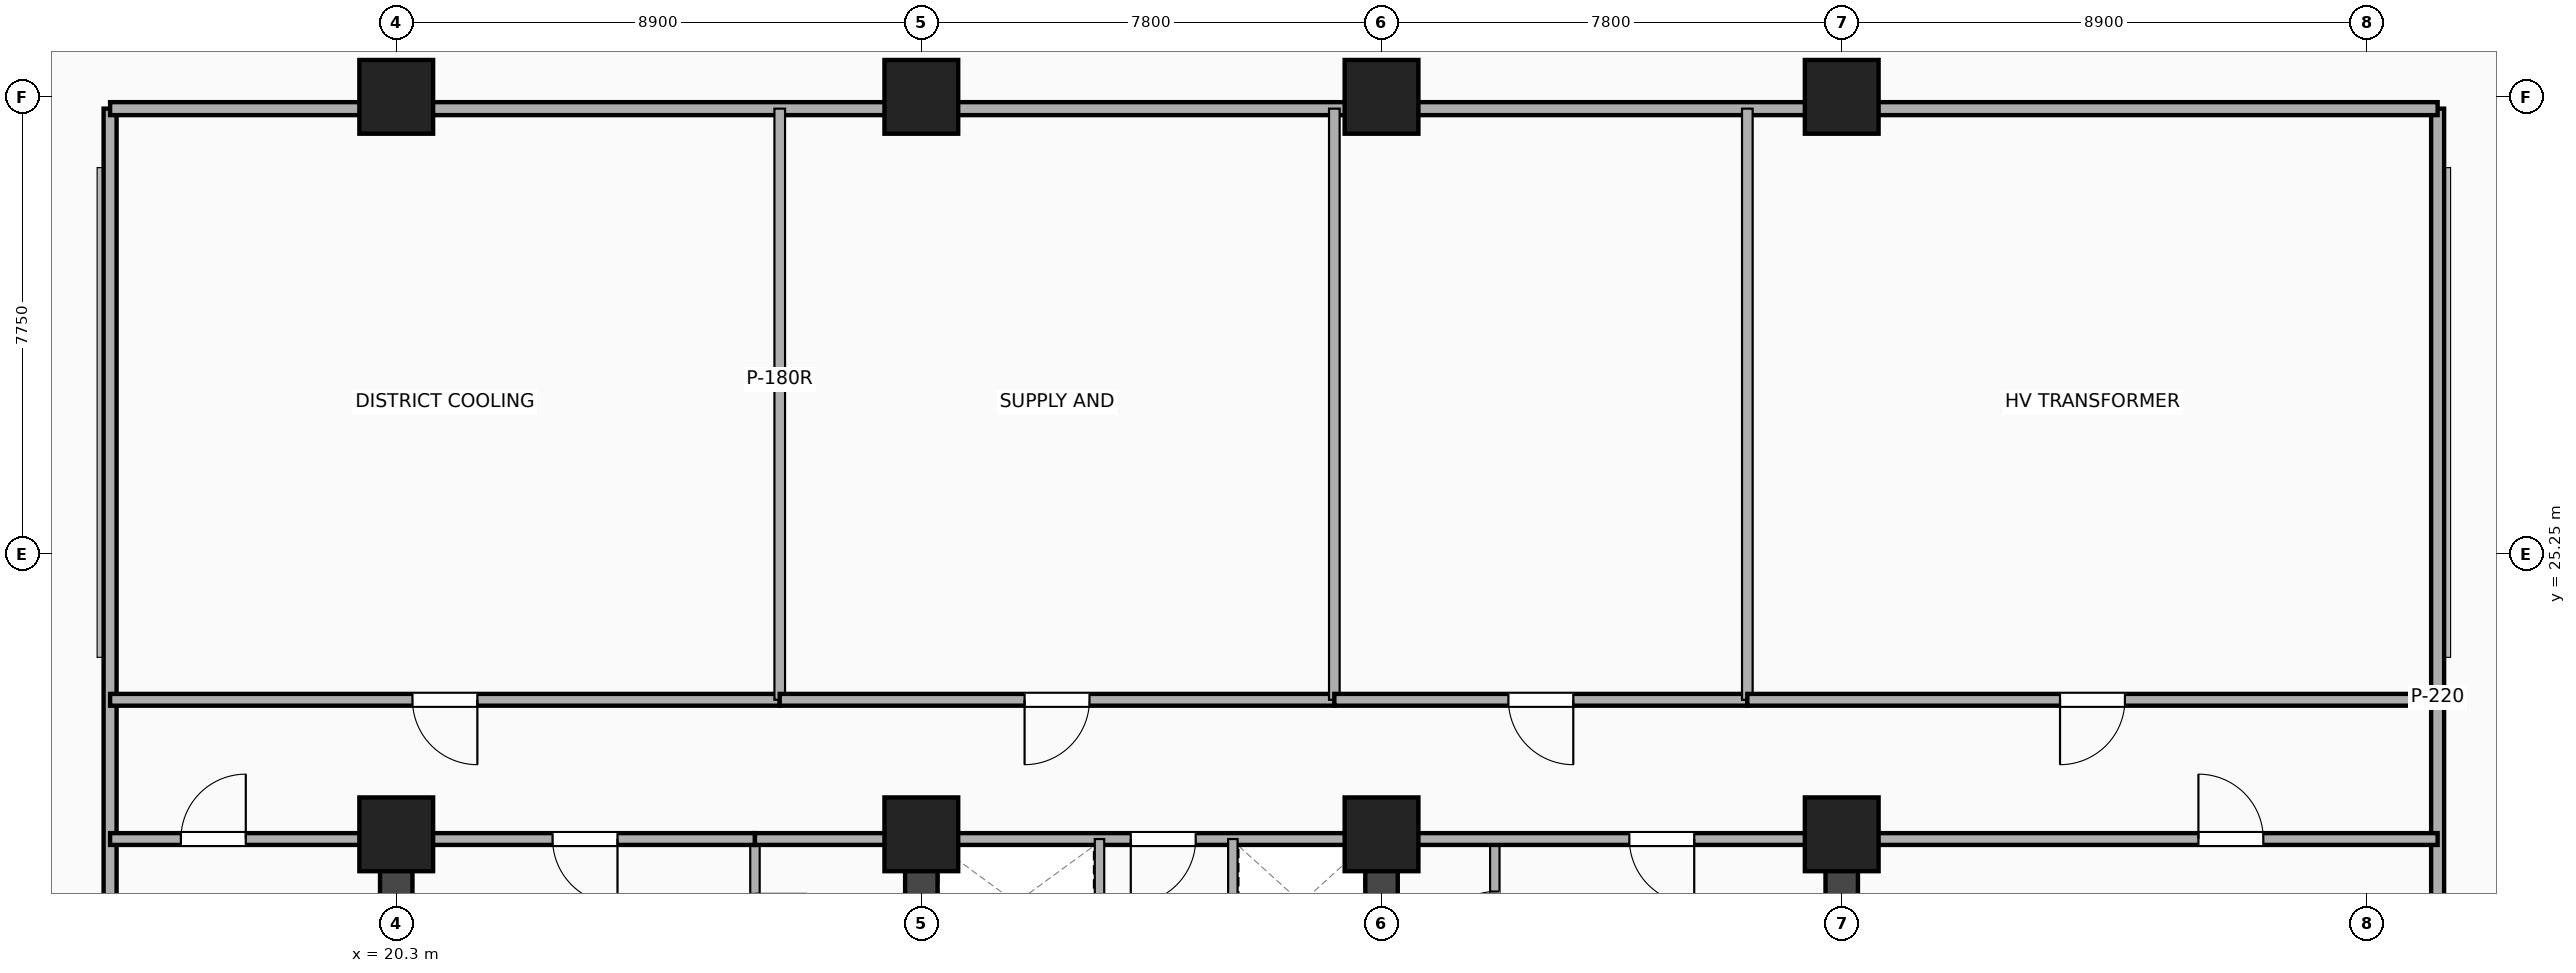
"""IFC4 building model, lengths in metres.
Left out: names, types, materials, properties, quantities, classifications, styles, units other than length and angle.
Written with IfcOpenShell. Run it as: python <this file> out.ifc"""

import sys

from ifc_helpers import new_model, si_unit, direction, frame, frame_2d, origin, origin_2d, place, context, subcontext, project, spatial, rectangle, extrude, element, fill, save


model = new_model("IFC4")
c1 = context("Model", 3, precision=1e-05, world=origin(), true_north=direction((0.0, 1.0)))
c2 = subcontext(c1, "Body", "Model", "MODEL_VIEW")
j1 = project(units=[si_unit("LENGTHUNIT", "METRE"), si_unit("PLANEANGLEUNIT", "RADIAN")], contexts=[c1])
p1 = place(None, origin())
s1 = spatial("IfcSite", under=j1, at=p1, CompositionType="ELEMENT")
p2 = place(p1, origin())
s2 = spatial("IfcBuilding", under=s1, at=p2, CompositionType="ELEMENT")
p3 = place(p2, frame((0.0, 0.0, 130.2)))
s3 = spatial("IfcBuildingStorey", under=s2, at=p3, CompositionType="ELEMENT", Elevation=130.2)
for number, where, z_axis, x_axis in (
    (1, (20.3, 3.5, 0.0), (0.0, 0.0, 1.0), (0.0, 1.0, 0.0)),
    (2, (44.8, 3.5, 0.0), (0.0, 0.0, 1.0), (0.0, 1.0, 0.0)),
):
    element("IfcWall", number, at=place(p3, frame(where, z_axis=z_axis, x_axis=x_axis)), inside=s3, PredefinedType="SHEAR", context=c2, shape_type="SweptSolid", body=[
        extrude(rectangle(XDim=16.9, YDim=0.55, at=frame_2d((8.45, 0.0))), origin(), (0.0, 0.0, 1.0), 8.15),
    ])
p4 = place(p3, frame((29.2, 3.5, 0.0), z_axis=(0.0, 0.0, 1.0), x_axis=(0.0, 1.0, 0.0)))
e3 = element("IfcWall", 3, at=p4, inside=s3, PredefinedType="SHEAR", context=c2, shape_type="SweptSolid", body=[
    extrude(rectangle(XDim=16.9, YDim=0.55, at=frame_2d((8.45, 0.0))), origin(), (0.0, 0.0, 1.0), 8.15),
])
p5 = place(p4, frame((7.75, 0.0, 0.0), z_axis=(0.0, 0.0, 1.0), x_axis=(-1.0, 0.0, 0.0)))
e4 = element("IfcOpeningElement", 4, at=p5, cuts=e3, PredefinedType="OPENING", context=c2, shape_type="SweptSolid", body=[
    extrude(rectangle(XDim=1.1, YDim=2.15, at=frame_2d((0.55, 1.075))), frame((0.0, 0.285, 0.0), z_axis=(0.0, -1.0, 0.0), x_axis=(1.0, 0.0, 0.0)), (0.0, 0.0, 1.0), 0.57),
])
p6 = place(p3, frame((37.0, 3.5, 0.0), z_axis=(0.0, 0.0, 1.0), x_axis=(0.0, 1.0, 0.0)))
e5 = element("IfcWall", 5, at=p6, inside=s3, PredefinedType="SHEAR", context=c2, shape_type="SweptSolid", body=[
    extrude(rectangle(XDim=16.9, YDim=0.55, at=frame_2d((8.45, 0.0))), origin(), (0.0, 0.0, 1.0), 8.15),
])
p7 = place(p6, frame((6.65, 0.0, 0.0)))
e6 = element("IfcOpeningElement", 6, at=p7, cuts=e5, PredefinedType="OPENING", context=c2, shape_type="SweptSolid", body=[
    extrude(rectangle(XDim=1.1, YDim=2.15, at=frame_2d((0.55, 1.075))), frame((0.0, 0.285, 0.0), z_axis=(0.0, -1.0, 0.0), x_axis=(1.0, 0.0, 0.0)), (0.0, 0.0, 1.0), 0.57),
])
for number, where, z_axis, x_axis in (
    (7, (20.3, 20.5, -0.32), (0.0, 0.0, 1.0), (1.0, 0.0, 0.0)),
    (8, (29.2, 20.5, -0.32), (0.0, 0.0, 1.0), (1.0, 0.0, 0.0)),
    (9, (37.0, 20.5, -0.32), (0.0, 0.0, 1.0), (1.0, 0.0, 0.0)),
    (10, (44.8, 20.5, -0.32), (0.0, 0.0, 1.0), (1.0, 0.0, 0.0)),
    (11, (20.3, 33.0, -0.32), (0.0, 0.0, 1.0), (1.0, 0.0, 0.0)),
    (12, (29.2, 33.0, -0.32), (0.0, 0.0, 1.0), (1.0, 0.0, 0.0)),
    (13, (37.0, 33.0, -0.32), (0.0, 0.0, 1.0), (1.0, 0.0, 0.0)),
    (14, (44.8, 33.0, -0.32), (0.0, 0.0, 1.0), (1.0, 0.0, 0.0)),
):
    element("IfcColumn", number, at=place(p3, frame(where, z_axis=z_axis, x_axis=x_axis)), inside=s3, PredefinedType="COLUMN", context=c2, shape_type="SweptSolid", body=[
        extrude(rectangle(XDim=1.25, YDim=1.25, at=origin_2d()), origin(), (0.0, 0.0, 1.0), 8.47),
    ])
p8 = place(p3, frame((26.38, 17.76, 0.0), z_axis=(0.0, 0.0, 1.0), x_axis=(0.0, 1.0, 0.0)))
e15 = element("IfcWall", 15, at=p8, inside=s3, PredefinedType="PARTITIONING", context=c2, shape_type="SweptSolid", body=[
    extrude(rectangle(XDim=2.66, YDim=0.16, at=frame_2d((1.33, 0.0))), origin(), (0.0, 0.0, 1.0), 7.524),
])
p9 = place(p8, frame((0.85, 0.0, 0.0)))
e16 = element("IfcOpeningElement", 16, at=p9, cuts=e15, PredefinedType="OPENING", context=c2, shape_type="SweptSolid", body=[
    extrude(rectangle(XDim=0.88, YDim=2.08, at=frame_2d((0.44, 1.04))), frame((0.0, 0.09, 0.0), z_axis=(0.0, -1.0, 0.0), x_axis=(1.0, 0.0, 0.0)), (0.0, 0.0, 1.0), 0.18),
])
p10 = place(p3, frame((38.92, 17.76, 0.0), z_axis=(0.0, 0.0, 1.0), x_axis=(0.0, 1.0, 0.0)))
e17 = element("IfcWall", 17, at=p10, inside=s3, PredefinedType="PARTITIONING", context=c2, shape_type="SweptSolid", body=[
    extrude(rectangle(XDim=2.66, YDim=0.16, at=frame_2d((1.33, 0.0))), origin(), (0.0, 0.0, 1.0), 7.524),
])
p11 = place(p10, frame((1.77, 0.0, 0.0), z_axis=(0.0, 0.0, 1.0), x_axis=(-1.0, 0.0, 0.0)))
e18 = element("IfcOpeningElement", 18, at=p11, cuts=e17, PredefinedType="OPENING", context=c2, shape_type="SweptSolid", body=[
    extrude(rectangle(XDim=0.92, YDim=2.08, at=frame_2d((0.46, 1.04))), frame((0.0, 0.09, 0.0), z_axis=(0.0, -1.0, 0.0), x_axis=(1.0, 0.0, 0.0)), (0.0, 0.0, 1.0), 0.18),
])
p12 = place(p3, frame((20.65, 20.42, 0.0), z_axis=(0.0, 0.0, 1.0), x_axis=(1.0, 0.0, 0.0)))
e19 = element("IfcWall", 19, at=p12, inside=s3, PredefinedType="PARTITIONING", context=c2, shape_type="SweptSolid", body=[
    extrude(rectangle(XDim=5.73, YDim=0.2, at=frame_2d((2.865, 0.0))), origin(), (0.0, 0.0, 1.0), 7.223),
])
p13 = place(p12, frame((2.3, 0.0, 0.0)))
e20 = element("IfcOpeningElement", 20, at=p13, cuts=e19, PredefinedType="OPENING", context=c2, shape_type="SweptSolid", body=[
    extrude(rectangle(XDim=1.1, YDim=2.15, at=frame_2d((0.55, 1.075))), frame((0.0, 0.11, 0.0), z_axis=(0.0, -1.0, 0.0), x_axis=(1.0, 0.0, 0.0)), (0.0, 0.0, 1.0), 0.22),
])
p14 = place(p3, frame((26.38, 20.42, 0.0), z_axis=(0.0, 0.0, 1.0), x_axis=(1.0, 0.0, 0.0)))
e21 = element("IfcWall", 21, at=p14, inside=s3, PredefinedType="PARTITIONING", context=c2, shape_type="SweptSolid", body=[
    extrude(rectangle(XDim=2.82, YDim=0.2, at=frame_2d((1.41, 0.0))), origin(), (0.0, 0.0, 1.0), 7.223),
])
p15 = place(p3, frame((29.2, 20.42, 0.0), z_axis=(0.0, 0.0, 1.0), x_axis=(1.0, 0.0, 0.0)))
e22 = element("IfcWall", 22, at=p15, inside=s3, PredefinedType="PARTITIONING", context=c2, shape_type="SweptSolid", body=[
    extrude(rectangle(XDim=7.8, YDim=0.2, at=frame_2d((3.9, 0.0))), origin(), (0.0, 0.0, 1.0), 7.223),
])
p16 = place(p15, frame((3.55, 0.0, 0.0)))
e23 = element("IfcOpeningElement", 23, at=p16, cuts=e22, PredefinedType="OPENING", context=c2, shape_type="SweptSolid", body=[
    extrude(rectangle(XDim=1.1, YDim=2.15, at=frame_2d((0.55, 1.075))), frame((0.0, 0.11, 0.0), z_axis=(0.0, -1.0, 0.0), x_axis=(1.0, 0.0, 0.0)), (0.0, 0.0, 1.0), 0.22),
])
p17 = place(p3, frame((37.0, 20.42, 0.0), z_axis=(0.0, 0.0, 1.0), x_axis=(1.0, 0.0, 0.0)))
e24 = element("IfcWall", 24, at=p17, inside=s3, PredefinedType="PARTITIONING", context=c2, shape_type="SweptSolid", body=[
    extrude(rectangle(XDim=7.45, YDim=0.2, at=frame_2d((3.725, 0.0))), origin(), (0.0, 0.0, 1.0), 6.455),
])
p18 = place(p17, frame((4.2, 0.0, 0.0)))
e25 = element("IfcOpeningElement", 25, at=p18, cuts=e24, PredefinedType="OPENING", context=c2, shape_type="SweptSolid", body=[
    extrude(rectangle(XDim=1.1, YDim=2.15, at=frame_2d((0.55, 1.075))), frame((0.0, 0.11, 0.0), z_axis=(0.0, -1.0, 0.0), x_axis=(1.0, 0.0, 0.0)), (0.0, 0.0, 1.0), 0.22),
])
p19 = place(p3, frame((32.22, 12.5, 0.0), z_axis=(0.0, 0.0, 1.0), x_axis=(0.0, 1.0, 0.0)))
e26 = element("IfcWall", 26, at=p19, inside=s3, PredefinedType="PARTITIONING", context=c2, shape_type="SweptSolid", body=[
    extrude(rectangle(XDim=7.92, YDim=0.16, at=frame_2d((3.96, 0.0))), origin(), (0.0, 0.0, 1.0), 7.524),
])
p20 = place(p19, frame((6.1, 0.0, 0.0)))
e27 = element("IfcOpeningElement", 27, at=p20, cuts=e26, PredefinedType="OPENING", context=c2, shape_type="SweptSolid", body=[
    extrude(rectangle(XDim=0.88, YDim=2.08, at=frame_2d((0.44, 1.04))), frame((0.0, 0.09, 0.0), z_axis=(0.0, -1.0, 0.0), x_axis=(1.0, 0.0, 0.0)), (0.0, 0.0, 1.0), 0.18),
])
p21 = place(p3, frame((34.48, 12.5, 0.0), z_axis=(0.0, 0.0, 1.0), x_axis=(0.0, 1.0, 0.0)))
e28 = element("IfcWall", 28, at=p21, inside=s3, PredefinedType="PARTITIONING", context=c2, shape_type="SweptSolid", body=[
    extrude(rectangle(XDim=7.92, YDim=0.16, at=frame_2d((3.96, 0.0))), origin(), (0.0, 0.0, 1.0), 7.524),
])
p22 = place(p21, frame((6.98, 0.0, 0.0), z_axis=(0.0, 0.0, 1.0), x_axis=(-1.0, 0.0, 0.0)))
e29 = element("IfcOpeningElement", 29, at=p22, cuts=e28, PredefinedType="OPENING", context=c2, shape_type="SweptSolid", body=[
    extrude(rectangle(XDim=0.88, YDim=2.08, at=frame_2d((0.44, 1.04))), frame((0.0, 0.09, 0.0), z_axis=(0.0, -1.0, 0.0), x_axis=(1.0, 0.0, 0.0)), (0.0, 0.0, 1.0), 0.18),
])
p23 = place(p3, frame((15.45, 12.0, 0.0), z_axis=(0.0, 0.0, 1.0), x_axis=(0.0, 1.0, 0.0)))
e30 = element("IfcWall", 30, at=p23, inside=s3, PredefinedType="PARTITIONING", context=c2, shape_type="SweptSolid", body=[
    extrude(rectangle(XDim=20.8, YDim=0.22, at=frame_2d((10.4, 0.0))), origin(), (0.0, 0.0, 1.0), 7.223),
])
p24 = place(p3, frame((54.9, 12.0, 0.0), z_axis=(0.0, 0.0, 1.0), x_axis=(0.0, 1.0, 0.0)))
e31 = element("IfcWall", 31, at=p24, inside=s3, PredefinedType="PARTITIONING", context=c2, shape_type="SweptSolid", body=[
    extrude(rectangle(XDim=20.8, YDim=0.22, at=frame_2d((10.4, 0.0))), origin(), (0.0, 0.0, 1.0), 6.455),
])
p25 = place(p3, frame((15.45, 32.8, 0.0), z_axis=(0.0, 0.0, 1.0), x_axis=(1.0, 0.0, 0.0)))
e32 = element("IfcWall", 32, at=p25, inside=s3, PredefinedType="PARTITIONING", context=c2, shape_type="SweptSolid", body=[
    extrude(rectangle(XDim=39.45, YDim=0.22, at=frame_2d((19.725, 0.0))), origin(), (0.0, 0.0, 1.0), 6.455),
])
p26 = place(p3, frame((15.45, 20.42, 0.0), z_axis=(0.0, 0.0, 1.0), x_axis=(1.0, 0.0, 0.0)))
e33 = element("IfcWall", 33, at=p26, inside=s3, PredefinedType="PARTITIONING", context=c2, shape_type="SweptSolid", body=[
    extrude(rectangle(XDim=4.85, YDim=0.2, at=frame_2d((2.425, 0.0))), origin(), (0.0, 0.0, 1.0), 7.223),
])
p27 = place(p26, frame((2.3, 0.0, 0.0), z_axis=(0.0, 0.0, 1.0), x_axis=(-1.0, 0.0, 0.0)))
e34 = element("IfcOpeningElement", 34, at=p27, cuts=e33, PredefinedType="OPENING", context=c2, shape_type="SweptSolid", body=[
    extrude(rectangle(XDim=1.1, YDim=2.15, at=frame_2d((0.55, 1.075))), frame((0.0, 0.11, 0.0), z_axis=(0.0, -1.0, 0.0), x_axis=(1.0, 0.0, 0.0)), (0.0, 0.0, 1.0), 0.22),
])
p28 = place(p3, frame((44.8, 20.42, 0.0), z_axis=(0.0, 0.0, 1.0), x_axis=(1.0, 0.0, 0.0)))
e35 = element("IfcWall", 35, at=p28, inside=s3, PredefinedType="PARTITIONING", context=c2, shape_type="SweptSolid", body=[
    extrude(rectangle(XDim=10.1, YDim=0.2, at=frame_2d((5.05, 0.0))), origin(), (0.0, 0.0, 1.0), 6.455),
])
p29 = place(p28, frame((7.146, 0.0, 0.0), z_axis=(0.0, 0.0, 1.0), x_axis=(-1.0, 0.0, 0.0)))
e36 = element("IfcOpeningElement", 36, at=p29, cuts=e35, PredefinedType="OPENING", context=c2, shape_type="SweptSolid", body=[
    extrude(rectangle(XDim=1.1, YDim=2.15, at=frame_2d((0.55, 1.075))), frame((0.0, 0.11, 0.0), z_axis=(0.0, -1.0, 0.0), x_axis=(1.0, 0.0, 0.0)), (0.0, 0.0, 1.0), 0.22),
])
p30 = place(p3, frame((15.45, 22.78, 0.0), z_axis=(0.0, 0.0, 1.0), x_axis=(1.0, 0.0, 0.0)))
e37 = element("IfcWall", 37, at=p30, inside=s3, PredefinedType="PARTITIONING", context=c2, shape_type="SweptSolid", body=[
    extrude(rectangle(XDim=11.35, YDim=0.2, at=frame_2d((5.675, 0.0))), origin(), (0.0, 0.0, 1.0), 7.223),
])
p31 = place(p30, frame((5.125, 0.0, 0.0)))
e38 = element("IfcOpeningElement", 38, at=p31, cuts=e37, PredefinedType="OPENING", context=c2, shape_type="SweptSolid", body=[
    extrude(rectangle(XDim=1.1, YDim=2.15, at=frame_2d((0.55, 1.075))), frame((0.0, 0.11, 0.0), z_axis=(0.0, -1.0, 0.0), x_axis=(1.0, 0.0, 0.0)), (0.0, 0.0, 1.0), 0.22),
])
p32 = place(p3, frame((26.8, 22.78, 0.0), z_axis=(0.0, 0.0, 1.0), x_axis=(0.0, 1.0, 0.0)))
e39 = element("IfcWall", 39, at=p32, inside=s3, PredefinedType="PARTITIONING", context=c2, shape_type="SweptSolid", body=[
    extrude(rectangle(XDim=10.02, YDim=0.18, at=frame_2d((5.01, 0.0))), origin(), (0.0, 0.0, 1.0), 7.524),
])
p33 = place(p3, frame((26.8, 22.78, 0.0), z_axis=(0.0, 0.0, 1.0), x_axis=(1.0, 0.0, 0.0)))
e40 = element("IfcWall", 40, at=p33, inside=s3, PredefinedType="PARTITIONING", context=c2, shape_type="SweptSolid", body=[
    extrude(rectangle(XDim=9.4, YDim=0.2, at=frame_2d((4.7, 0.0))), origin(), (0.0, 0.0, 1.0), 7.223),
])
p34 = place(p33, frame((4.15, 0.0, 0.0)))
e41 = element("IfcOpeningElement", 41, at=p34, cuts=e40, PredefinedType="OPENING", context=c2, shape_type="SweptSolid", body=[
    extrude(rectangle(XDim=1.1, YDim=2.15, at=frame_2d((0.55, 1.075))), frame((0.0, 0.11, 0.0), z_axis=(0.0, -1.0, 0.0), x_axis=(1.0, 0.0, 0.0)), (0.0, 0.0, 1.0), 0.22),
])
p35 = place(p3, frame((36.2, 22.78, 0.0), z_axis=(0.0, 0.0, 1.0), x_axis=(0.0, 1.0, 0.0)))
e42 = element("IfcWall", 42, at=p35, inside=s3, PredefinedType="PARTITIONING", context=c2, shape_type="SweptSolid", body=[
    extrude(rectangle(XDim=10.02, YDim=0.18, at=frame_2d((5.01, 0.0))), origin(), (0.0, 0.0, 1.0), 6.455),
])
p36 = place(p3, frame((36.2, 22.78, 0.0), z_axis=(0.0, 0.0, 1.0), x_axis=(1.0, 0.0, 0.0)))
e43 = element("IfcWall", 43, at=p36, inside=s3, PredefinedType="PARTITIONING", context=c2, shape_type="SweptSolid", body=[
    extrude(rectangle(XDim=7.0, YDim=0.2, at=frame_2d((3.5, 0.0))), origin(), (0.0, 0.0, 1.0), 7.223),
])
p37 = place(p36, frame((2.95, 0.0, 0.0)))
e44 = element("IfcOpeningElement", 44, at=p37, cuts=e43, PredefinedType="OPENING", context=c2, shape_type="SweptSolid", body=[
    extrude(rectangle(XDim=1.1, YDim=2.15, at=frame_2d((0.55, 1.075))), frame((0.0, 0.11, 0.0), z_axis=(0.0, -1.0, 0.0), x_axis=(1.0, 0.0, 0.0)), (0.0, 0.0, 1.0), 0.22),
])
p38 = place(p3, frame((43.2, 22.78, 0.0), z_axis=(0.0, 0.0, 1.0), x_axis=(0.0, 1.0, 0.0)))
e45 = element("IfcWall", 45, at=p38, inside=s3, PredefinedType="PARTITIONING", context=c2, shape_type="SweptSolid", body=[
    extrude(rectangle(XDim=10.02, YDim=0.18, at=frame_2d((5.01, 0.0))), origin(), (0.0, 0.0, 1.0), 7.524),
])
p39 = place(p3, frame((43.2, 22.78, 0.0), z_axis=(0.0, 0.0, 1.0), x_axis=(1.0, 0.0, 0.0)))
e46 = element("IfcWall", 46, at=p39, inside=s3, PredefinedType="PARTITIONING", context=c2, shape_type="SweptSolid", body=[
    extrude(rectangle(XDim=11.7, YDim=0.2, at=frame_2d((5.85, 0.0))), origin(), (0.0, 0.0, 1.0), 7.223),
])
p40 = place(p39, frame((5.3, 0.0, 0.0)))
e47 = element("IfcOpeningElement", 47, at=p40, cuts=e46, PredefinedType="OPENING", context=c2, shape_type="SweptSolid", body=[
    extrude(rectangle(XDim=1.1, YDim=2.15, at=frame_2d((0.55, 1.075))), frame((0.0, 0.11, 0.0), z_axis=(0.0, -1.0, 0.0), x_axis=(1.0, 0.0, 0.0)), (0.0, 0.0, 1.0), 0.22),
])
p41 = place(p11, origin())
e48 = element("IfcDoor", 48, at=p41, inside=s3, OperationType="SINGLE_SWING_LEFT", PredefinedType="DOOR", context=c2, shape_type="SweptSolid", body=[
    extrude(rectangle(XDim=0.92, YDim=2.08, at=frame_2d((0.46, 1.04))), frame((0.0, 0.025, 0.0), z_axis=(0.0, -1.0, 0.0), x_axis=(1.0, 0.0, 0.0)), (0.0, 0.0, 1.0), 0.05),
])
fill(e18, e48)
p42 = place(p13, origin())
e49 = element("IfcDoor", 49, at=p42, inside=s3, OperationType="SINGLE_SWING_RIGHT", PredefinedType="DOOR", context=c2, shape_type="SweptSolid", body=[
    extrude(rectangle(XDim=1.1, YDim=2.15, at=frame_2d((0.55, 1.075))), frame((0.0, 0.025, 0.0), z_axis=(0.0, -1.0, 0.0), x_axis=(1.0, 0.0, 0.0)), (0.0, 0.0, 1.0), 0.05),
])
fill(e20, e49)
p43 = place(p16, origin())
e50 = element("IfcDoor", 50, at=p43, inside=s3, OperationType="SINGLE_SWING_LEFT", PredefinedType="DOOR", context=c2, shape_type="SweptSolid", body=[
    extrude(rectangle(XDim=1.1, YDim=2.15, at=frame_2d((0.55, 1.075))), frame((0.0, 0.025, 0.0), z_axis=(0.0, -1.0, 0.0), x_axis=(1.0, 0.0, 0.0)), (0.0, 0.0, 1.0), 0.05),
])
fill(e23, e50)
p44 = place(p18, origin())
e51 = element("IfcDoor", 51, at=p44, inside=s3, OperationType="SINGLE_SWING_RIGHT", PredefinedType="DOOR", context=c2, shape_type="SweptSolid", body=[
    extrude(rectangle(XDim=1.1, YDim=2.15, at=frame_2d((0.55, 1.075))), frame((0.0, 0.025, 0.0), z_axis=(0.0, -1.0, 0.0), x_axis=(1.0, 0.0, 0.0)), (0.0, 0.0, 1.0), 0.05),
])
fill(e25, e51)
p45 = place(p27, origin())
e52 = element("IfcDoor", 52, at=p45, inside=s3, OperationType="SINGLE_SWING_RIGHT", PredefinedType="DOOR", context=c2, shape_type="SweptSolid", body=[
    extrude(rectangle(XDim=1.1, YDim=2.15, at=frame_2d((0.55, 1.075))), frame((0.0, 0.025, 0.0), z_axis=(0.0, -1.0, 0.0), x_axis=(1.0, 0.0, 0.0)), (0.0, 0.0, 1.0), 0.05),
])
fill(e34, e52)
p46 = place(p29, origin())
e53 = element("IfcDoor", 53, at=p46, inside=s3, OperationType="SINGLE_SWING_LEFT", PredefinedType="DOOR", context=c2, shape_type="SweptSolid", body=[
    extrude(rectangle(XDim=1.1, YDim=2.15, at=frame_2d((0.55, 1.075))), frame((0.0, 0.025, 0.0), z_axis=(0.0, -1.0, 0.0), x_axis=(1.0, 0.0, 0.0)), (0.0, 0.0, 1.0), 0.05),
])
fill(e36, e53)
p47 = place(p31, origin())
e54 = element("IfcDoor", 54, at=p47, inside=s3, OperationType="SINGLE_SWING_RIGHT", PredefinedType="DOOR", context=c2, shape_type="SweptSolid", body=[
    extrude(rectangle(XDim=1.1, YDim=2.15, at=frame_2d((0.55, 1.075))), frame((0.0, 0.025, 0.0), z_axis=(0.0, -1.0, 0.0), x_axis=(1.0, 0.0, 0.0)), (0.0, 0.0, 1.0), 0.05),
])
fill(e38, e54)
p48 = place(p34, origin())
e55 = element("IfcDoor", 55, at=p48, inside=s3, OperationType="SINGLE_SWING_LEFT", PredefinedType="DOOR", context=c2, shape_type="SweptSolid", body=[
    extrude(rectangle(XDim=1.1, YDim=2.15, at=frame_2d((0.55, 1.075))), frame((0.0, 0.025, 0.0), z_axis=(0.0, -1.0, 0.0), x_axis=(1.0, 0.0, 0.0)), (0.0, 0.0, 1.0), 0.05),
])
fill(e41, e55)
p49 = place(p37, origin())
e56 = element("IfcDoor", 56, at=p49, inside=s3, OperationType="SINGLE_SWING_RIGHT", PredefinedType="DOOR", context=c2, shape_type="SweptSolid", body=[
    extrude(rectangle(XDim=1.1, YDim=2.15, at=frame_2d((0.55, 1.075))), frame((0.0, 0.025, 0.0), z_axis=(0.0, -1.0, 0.0), x_axis=(1.0, 0.0, 0.0)), (0.0, 0.0, 1.0), 0.05),
])
fill(e44, e56)
p50 = place(p40, origin())
e57 = element("IfcDoor", 57, at=p50, inside=s3, OperationType="SINGLE_SWING_LEFT", PredefinedType="DOOR", context=c2, shape_type="SweptSolid", body=[
    extrude(rectangle(XDim=1.1, YDim=2.15, at=frame_2d((0.55, 1.075))), frame((0.0, 0.025, 0.0), z_axis=(0.0, -1.0, 0.0), x_axis=(1.0, 0.0, 0.0)), (0.0, 0.0, 1.0), 0.05),
])
fill(e47, e57)
save(model, sys.argv[1])
